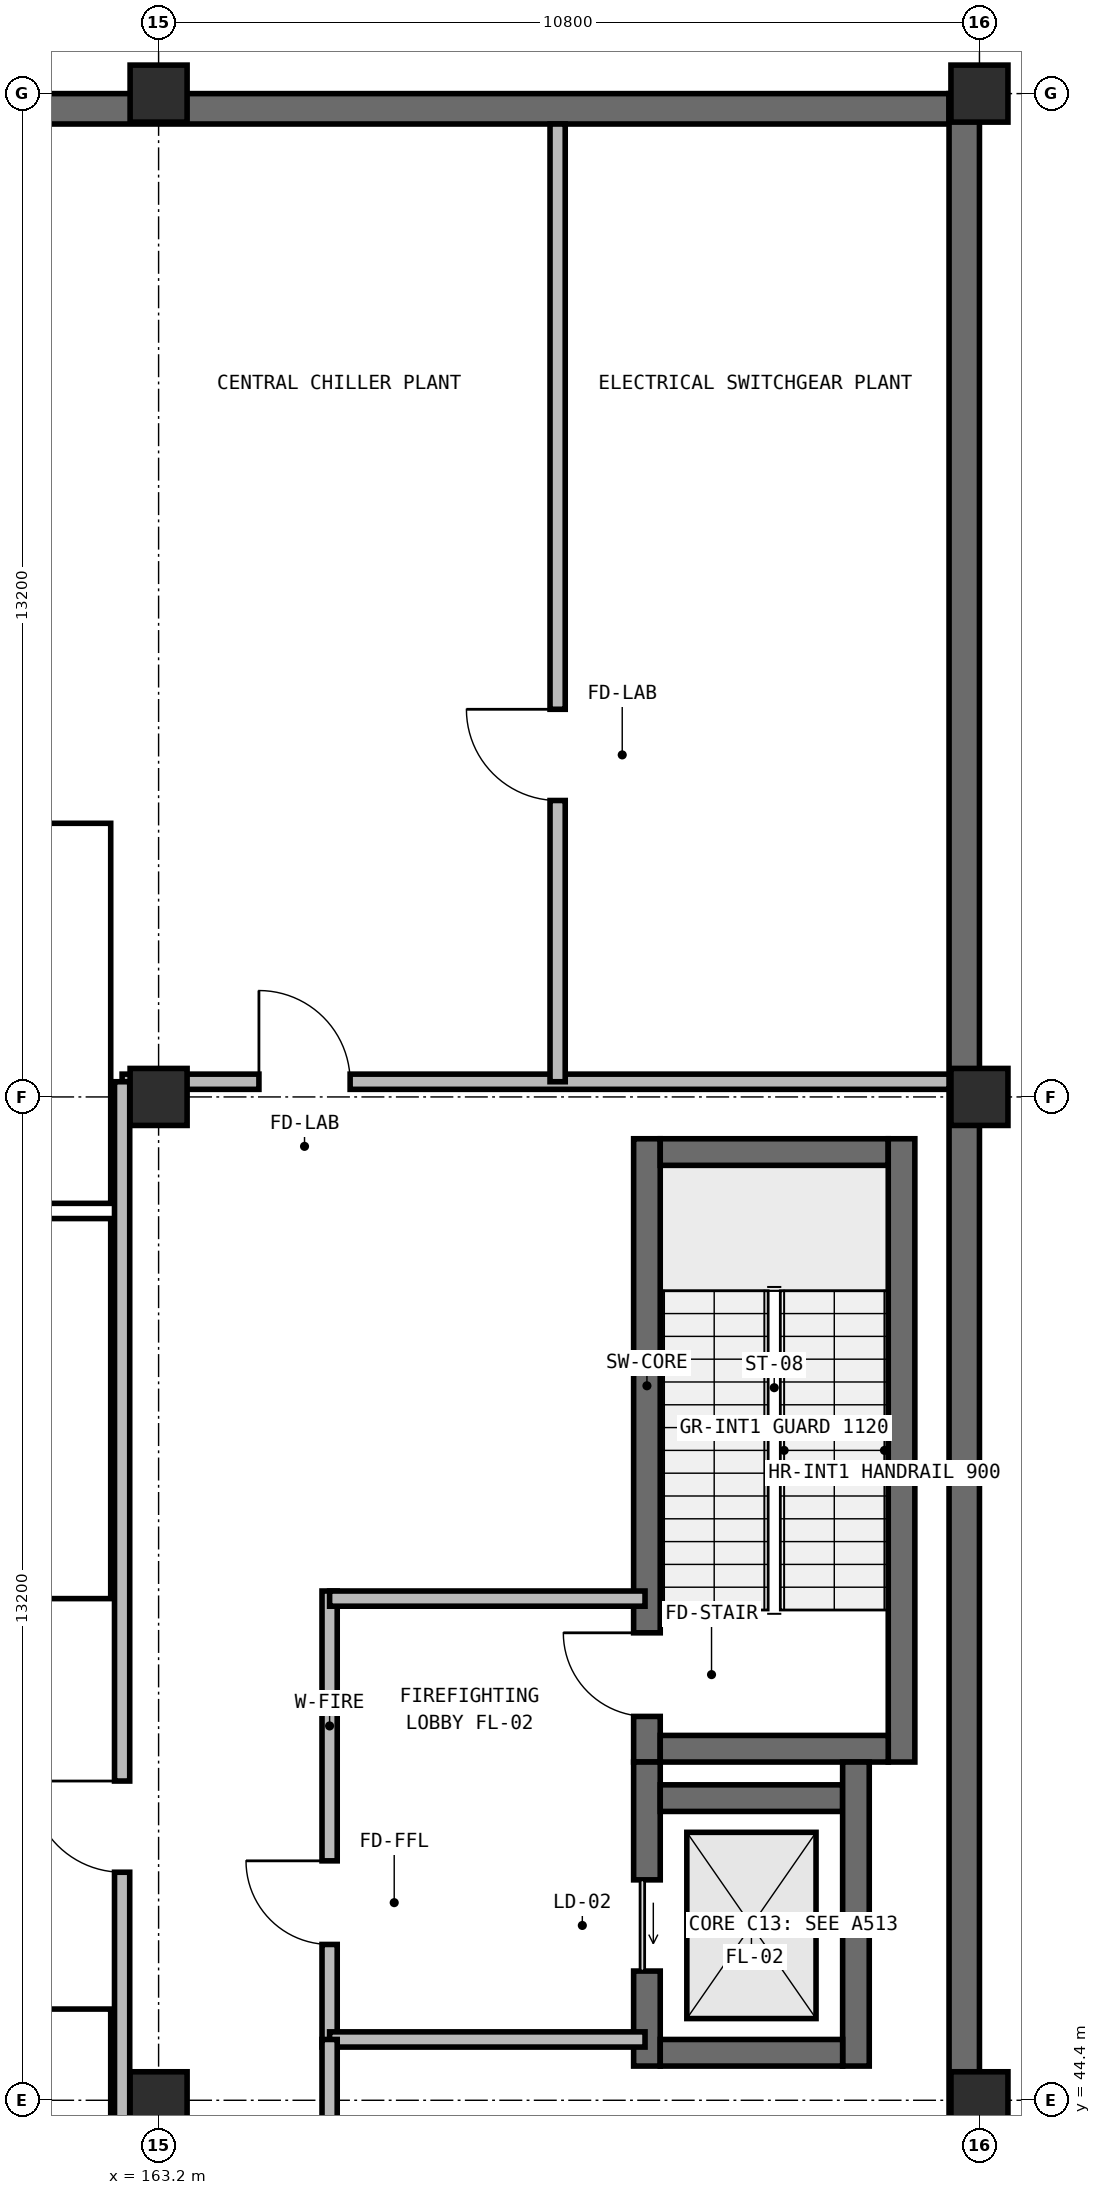
"""IFC4 building model, lengths in metres.
Left out: names, types, materials, properties, quantities, classifications, styles, units other than length and angle.
Written with IfcOpenShell. Run it as: python <this file> out.ifc"""

import sys

from ifc_helpers import new_model, si_unit, direction, frame, frame_2d, origin, origin_2d, place, context, subcontext, project, spatial, rectangle, extrude, element, fill, save


model = new_model("IFC4")
c1 = context("Model", 3, precision=1e-05, world=origin(), true_north=direction((0.0, 1.0)))
c2 = subcontext(c1, "Body", "Model", "MODEL_VIEW")
j1 = project(units=[si_unit("LENGTHUNIT", "METRE"), si_unit("PLANEANGLEUNIT", "RADIAN")], contexts=[c1])
p1 = place(None, origin())
s1 = spatial("IfcSite", under=j1, at=p1, CompositionType="ELEMENT")
p2 = place(p1, origin())
s2 = spatial("IfcBuilding", under=s1, at=p2, CompositionType="ELEMENT")
p3 = place(p2, frame((0.0, 0.0, -5.25)))
s3 = spatial("IfcBuildingStorey", under=s2, at=p3, CompositionType="ELEMENT", Elevation=-5.25)
p4 = place(p3, frame((169.625, 48.85, 0.0), z_axis=(0.0, 0.0, 1.0), x_axis=(0.0, 1.0, 0.0)))
e1 = element("IfcWall", 1, at=p4, inside=s3, PredefinedType="SHEAR", context=c2, shape_type="SweptSolid", body=[
    extrude(rectangle(XDim=8.2, YDim=0.35, at=frame_2d((4.1, 0.0))), origin(), (0.0, 0.0, 1.0), 5.25),
])
p5 = place(p4, frame((0.6, 0.0, 0.0)))
e2 = element("IfcOpeningElement", 2, at=p5, cuts=e1, PredefinedType="OPENING", context=c2, shape_type="SweptSolid", body=[
    extrude(rectangle(XDim=1.1, YDim=2.15, at=frame_2d((0.55, 1.075))), frame((0.0, 0.185, 0.0), z_axis=(0.0, -1.0, 0.0), x_axis=(1.0, 0.0, 0.0)), (0.0, 0.0, 1.0), 0.37),
])
p6 = place(p3, frame((169.8, 56.875, 0.0), z_axis=(0.0, 0.0, 1.0), x_axis=(1.0, 0.0, 0.0)))
e3 = element("IfcWall", 3, at=p6, inside=s3, PredefinedType="SHEAR", context=c2, shape_type="SweptSolid", body=[
    extrude(rectangle(XDim=3.0, YDim=0.35, at=frame_2d((1.5, 0.0))), origin(), (0.0, 0.0, 1.0), 5.25),
])
p7 = place(p3, frame((172.975, 57.05, 0.0), z_axis=(0.0, 0.0, 1.0), x_axis=(0.0, -1.0, 0.0)))
e4 = element("IfcWall", 4, at=p7, inside=s3, PredefinedType="SHEAR", context=c2, shape_type="SweptSolid", body=[
    extrude(rectangle(XDim=8.2, YDim=0.35, at=frame_2d((4.1, 0.0))), origin(), (0.0, 0.0, 1.0), 5.25),
])
p8 = place(p3, frame((172.8, 49.025, 0.0), z_axis=(0.0, 0.0, 1.0), x_axis=(-1.0, 0.0, 0.0)))
e5 = element("IfcWall", 5, at=p8, inside=s3, PredefinedType="SHEAR", context=c2, shape_type="SweptSolid", body=[
    extrude(rectangle(XDim=3.0, YDim=0.35, at=frame_2d((1.5, 0.0))), origin(), (0.0, 0.0, 1.0), 5.25),
])
p9 = place(p3, frame((169.625, 44.85, 0.0), z_axis=(0.0, 0.0, 1.0), x_axis=(0.0, 1.0, 0.0)))
e6 = element("IfcWall", 6, at=p9, inside=s3, PredefinedType="SHEAR", context=c2, shape_type="SweptSolid", body=[
    extrude(rectangle(XDim=4.0, YDim=0.35, at=frame_2d((2.0, 0.0))), origin(), (0.0, 0.0, 1.0), 5.25),
])
p10 = place(p9, frame((1.25, 0.0, 0.0)))
e7 = element("IfcOpeningElement", 7, at=p10, cuts=e6, PredefinedType="OPENING", context=c2, shape_type="SweptSolid", body=[
    extrude(rectangle(XDim=1.2, YDim=2.15, at=frame_2d((0.6, 1.075))), frame((0.0, 0.185, 0.0), z_axis=(0.0, -1.0, 0.0), x_axis=(1.0, 0.0, 0.0)), (0.0, 0.0, 1.0), 0.37),
])
p11 = place(p3, frame((169.8, 48.375, 0.0), z_axis=(0.0, 0.0, 1.0), x_axis=(1.0, 0.0, 0.0)))
e8 = element("IfcWall", 8, at=p11, inside=s3, PredefinedType="SHEAR", context=c2, shape_type="SweptSolid", body=[
    extrude(rectangle(XDim=2.4, YDim=0.35, at=frame_2d((1.2, 0.0))), origin(), (0.0, 0.0, 1.0), 5.25),
])
p12 = place(p3, frame((172.375, 48.85, 0.0), z_axis=(0.0, 0.0, 1.0), x_axis=(0.0, -1.0, 0.0)))
e9 = element("IfcWall", 9, at=p12, inside=s3, PredefinedType="SHEAR", context=c2, shape_type="SweptSolid", body=[
    extrude(rectangle(XDim=4.0, YDim=0.35, at=frame_2d((2.0, 0.0))), origin(), (0.0, 0.0, 1.0), 5.25),
])
p13 = place(p3, frame((172.2, 45.025, 0.0), z_axis=(0.0, 0.0, 1.0), x_axis=(-1.0, 0.0, 0.0)))
e10 = element("IfcWall", 10, at=p13, inside=s3, PredefinedType="SHEAR", context=c2, shape_type="SweptSolid", body=[
    extrude(rectangle(XDim=2.4, YDim=0.35, at=frame_2d((1.2, 0.0))), origin(), (0.0, 0.0, 1.0), 5.25),
])
p14 = place(p3, frame((126.4, 70.6, 0.0), z_axis=(0.0, 0.0, 1.0), x_axis=(1.0, 0.0, 0.0)))
e11 = element("IfcWall", 11, at=p14, inside=s3, PredefinedType="USERDEFINED", context=c2, shape_type="SweptSolid", body=[
    extrude(rectangle(XDim=47.2, YDim=0.4, at=frame_2d((23.6, 0.0))), origin(), (0.0, 0.0, 1.0), 5.25),
])
p15 = place(p3, frame((173.8, 70.8, 0.0), z_axis=(0.0, 0.0, 1.0), x_axis=(0.0, -1.0, 0.0)))
e12 = element("IfcWall", 12, at=p15, inside=s3, PredefinedType="USERDEFINED", context=c2, shape_type="SweptSolid", body=[
    extrude(rectangle(XDim=55.2, YDim=0.4, at=frame_2d((27.6, 0.0))), origin(), (0.0, 0.0, 1.0), 5.25),
])
for number, where, z_axis, x_axis in (
    (13, (163.2, 44.4, 0.0), (0.0, 0.0, 1.0), (1.0, 0.0, 0.0)),
    (14, (163.2, 57.6, 0.0), (0.0, 0.0, 1.0), (1.0, 0.0, 0.0)),
    (15, (163.2, 70.8, 0.0), (0.0, 0.0, 1.0), (1.0, 0.0, 0.0)),
    (16, (174.0, 44.4, 0.0), (0.0, 0.0, 1.0), (1.0, 0.0, 0.0)),
    (17, (174.0, 57.6, 0.0), (0.0, 0.0, 1.0), (1.0, 0.0, 0.0)),
    (18, (174.0, 70.8, 0.0), (0.0, 0.0, 1.0), (1.0, 0.0, 0.0)),
):
    element("IfcColumn", number, at=place(p3, frame(where, z_axis=z_axis, x_axis=x_axis)), inside=s3, PredefinedType="COLUMN", context=c2, shape_type="SweptSolid", body=[
        extrude(rectangle(XDim=0.75, YDim=0.75, at=origin_2d()), origin(), (0.0, 0.0, 1.0), 5.25),
    ])
p16 = place(p3, frame((165.45, 45.1, 0.0), z_axis=(0.0, 0.0, 1.0), x_axis=(0.0, 1.0, 0.0)))
e19 = element("IfcWall", 19, at=p16, inside=s3, PredefinedType="SOLIDWALL", context=c2, shape_type="SweptSolid", body=[
    extrude(rectangle(XDim=6.0, YDim=0.2, at=frame_2d((3.0, 0.0))), origin(), (0.0, 0.0, 1.0), 5.0),
])
p17 = place(p16, frame((1.35, 0.0, 0.0)))
e20 = element("IfcOpeningElement", 20, at=p17, cuts=e19, PredefinedType="OPENING", context=c2, shape_type="SweptSolid", body=[
    extrude(rectangle(XDim=1.1, YDim=2.15, at=frame_2d((0.55, 1.075))), frame((0.0, 0.11, 0.0), z_axis=(0.0, -1.0, 0.0), x_axis=(1.0, 0.0, 0.0)), (0.0, 0.0, 1.0), 0.22),
])
for number, where, z_axis, x_axis in (
    (21, (165.45, 45.2, 0.0), (0.0, 0.0, 1.0), (1.0, 0.0, 0.0)),
    (22, (165.45, 51.0, 0.0), (0.0, 0.0, 1.0), (1.0, 0.0, 0.0)),
):
    element("IfcWall", number, at=place(p3, frame(where, z_axis=z_axis, x_axis=x_axis)), inside=s3, PredefinedType="SOLIDWALL", context=c2, shape_type="SweptSolid", body=[
        extrude(rectangle(XDim=4.15, YDim=0.2, at=frame_2d((2.075, 0.0))), origin(), (0.0, 0.0, 1.0), 5.0),
    ])
p18 = place(p3, frame((165.45, 35.5, 0.0), z_axis=(0.0, 0.0, 1.0), x_axis=(0.0, 1.0, 0.0)))
e23 = element("IfcWall", 23, at=p18, inside=s3, PredefinedType="SOLIDWALL", context=c2, shape_type="SweptSolid", body=[
    extrude(rectangle(XDim=9.7, YDim=0.2, at=frame_2d((4.85, 0.0))), origin(), (0.0, 0.0, 1.0), 5.0),
])
p19 = place(p18, frame((3.4, 0.0, 0.0)))
e24 = element("IfcOpeningElement", 24, at=p19, cuts=e23, PredefinedType="OPENING", context=c2, shape_type="SweptSolid", body=[
    extrude(rectangle(XDim=1.2, YDim=2.2, at=frame_2d((0.6, 1.1))), frame((0.0, 0.11, 0.0), z_axis=(0.0, -1.0, 0.0), x_axis=(1.0, 0.0, 0.0)), (0.0, 0.0, 1.0), 0.22),
])
p20 = place(p3, frame((162.72, 57.8, 0.0), z_axis=(0.0, 0.0, 1.0), x_axis=(1.0, 0.0, 0.0)))
e25 = element("IfcWall", 25, at=p20, inside=s3, PredefinedType="SOLIDWALL", context=c2, shape_type="SweptSolid", body=[
    extrude(rectangle(XDim=10.88, YDim=0.2, at=frame_2d((5.44, 0.0))), origin(), (0.0, 0.0, 1.0), 5.0),
])
p21 = place(p20, frame((1.8, 0.0, 0.0)))
e26 = element("IfcOpeningElement", 26, at=p21, cuts=e25, PredefinedType="OPENING", context=c2, shape_type="SweptSolid", body=[
    extrude(rectangle(XDim=1.2, YDim=2.2, at=frame_2d((0.6, 1.1))), frame((0.0, 0.11, 0.0), z_axis=(0.0, -1.0, 0.0), x_axis=(1.0, 0.0, 0.0)), (0.0, 0.0, 1.0), 0.22),
])
p22 = place(p3, frame((168.45, 57.8, 0.0), z_axis=(0.0, 0.0, 1.0), x_axis=(0.0, 1.0, 0.0)))
e27 = element("IfcWall", 27, at=p22, inside=s3, PredefinedType="SOLIDWALL", context=c2, shape_type="SweptSolid", body=[
    extrude(rectangle(XDim=12.6, YDim=0.2, at=frame_2d((6.3, 0.0))), origin(), (0.0, 0.0, 1.0), 4.575),
])
p23 = place(p22, frame((3.7, 0.0, 0.0)))
e28 = element("IfcOpeningElement", 28, at=p23, cuts=e27, PredefinedType="OPENING", context=c2, shape_type="SweptSolid", body=[
    extrude(rectangle(XDim=1.2, YDim=2.2, at=frame_2d((0.6, 1.1))), frame((0.0, 0.11, 0.0), z_axis=(0.0, -1.0, 0.0), x_axis=(1.0, 0.0, 0.0)), (0.0, 0.0, 1.0), 0.22),
])
p24 = place(p3, frame((162.72, 16.0, 0.0), z_axis=(0.0, 0.0, 1.0), x_axis=(0.0, 1.0, 0.0)))
e29 = element("IfcWall", 29, at=p24, inside=s3, PredefinedType="SOLIDWALL", context=c2, shape_type="SweptSolid", body=[
    extrude(rectangle(XDim=41.8, YDim=0.2, at=frame_2d((20.9, 0.0))), origin(), (0.0, 0.0, 1.0), 5.0),
])
p25 = place(p24, frame((6.0, 0.0, 0.0)))
e30 = element("IfcOpeningElement", 30, at=p25, cuts=e29, PredefinedType="OPENING", context=c2, shape_type="SweptSolid", body=[
    extrude(rectangle(XDim=1.2, YDim=2.2, at=frame_2d((0.6, 1.1))), frame((0.0, 0.11, 0.0), z_axis=(0.0, -1.0, 0.0), x_axis=(1.0, 0.0, 0.0)), (0.0, 0.0, 1.0), 0.22),
])
p26 = place(p24, frame((31.4, 0.0, 0.0)))
e31 = element("IfcOpeningElement", 31, at=p26, cuts=e29, PredefinedType="OPENING", context=c2, shape_type="SweptSolid", body=[
    extrude(rectangle(XDim=1.2, YDim=2.2, at=frame_2d((0.6, 1.1))), frame((0.0, 0.11, 0.0), z_axis=(0.0, -1.0, 0.0), x_axis=(1.0, 0.0, 0.0)), (0.0, 0.0, 1.0), 0.22),
])
p27 = place(p5, origin())
e32 = element("IfcDoor", 32, at=p27, inside=s3, OperationType="SINGLE_SWING_RIGHT", PredefinedType="DOOR", context=c2, shape_type="SweptSolid", body=[
    extrude(rectangle(XDim=1.1, YDim=2.15, at=frame_2d((0.55, 1.075))), frame((0.0, 0.025, 0.0), z_axis=(0.0, -1.0, 0.0), x_axis=(1.0, 0.0, 0.0)), (0.0, 0.0, 1.0), 0.05),
])
fill(e2, e32)
p28 = place(p10, origin())
e33 = element("IfcDoor", 33, at=p28, inside=s3, OperationType="SLIDING_TO_LEFT", PredefinedType="USERDEFINED", context=c2, shape_type="SweptSolid", body=[
    extrude(rectangle(XDim=1.2, YDim=2.15, at=frame_2d((0.6, 1.075))), frame((0.0, 0.025, 0.0), z_axis=(0.0, -1.0, 0.0), x_axis=(1.0, 0.0, 0.0)), (0.0, 0.0, 1.0), 0.05),
])
fill(e7, e33)
p29 = place(p17, origin())
e34 = element("IfcDoor", 34, at=p29, inside=s3, OperationType="SINGLE_SWING_RIGHT", PredefinedType="DOOR", context=c2, shape_type="SweptSolid", body=[
    extrude(rectangle(XDim=1.1, YDim=2.15, at=frame_2d((0.55, 1.075))), frame((0.0, 0.025, 0.0), z_axis=(0.0, -1.0, 0.0), x_axis=(1.0, 0.0, 0.0)), (0.0, 0.0, 1.0), 0.05),
])
fill(e20, e34)
p30 = place(p21, origin())
e35 = element("IfcDoor", 35, at=p30, inside=s3, OperationType="SINGLE_SWING_LEFT", PredefinedType="DOOR", context=c2, shape_type="SweptSolid", body=[
    extrude(rectangle(XDim=1.2, YDim=2.2, at=frame_2d((0.6, 1.1))), frame((0.0, 0.025, 0.0), z_axis=(0.0, -1.0, 0.0), x_axis=(1.0, 0.0, 0.0)), (0.0, 0.0, 1.0), 0.05),
])
fill(e26, e35)
p31 = place(p23, origin())
e36 = element("IfcDoor", 36, at=p31, inside=s3, OperationType="SINGLE_SWING_RIGHT", PredefinedType="DOOR", context=c2, shape_type="SweptSolid", body=[
    extrude(rectangle(XDim=1.2, YDim=2.2, at=frame_2d((0.6, 1.1))), frame((0.0, 0.025, 0.0), z_axis=(0.0, -1.0, 0.0), x_axis=(1.0, 0.0, 0.0)), (0.0, 0.0, 1.0), 0.05),
])
fill(e28, e36)
p32 = place(p26, origin())
e37 = element("IfcDoor", 37, at=p32, inside=s3, OperationType="SINGLE_SWING_RIGHT", PredefinedType="DOOR", context=c2, shape_type="SweptSolid", body=[
    extrude(rectangle(XDim=1.2, YDim=2.2, at=frame_2d((0.6, 1.1))), frame((0.0, 0.025, 0.0), z_axis=(0.0, -1.0, 0.0), x_axis=(1.0, 0.0, 0.0)), (0.0, 0.0, 1.0), 0.05),
])
fill(e31, e37)
save(model, sys.argv[1])
